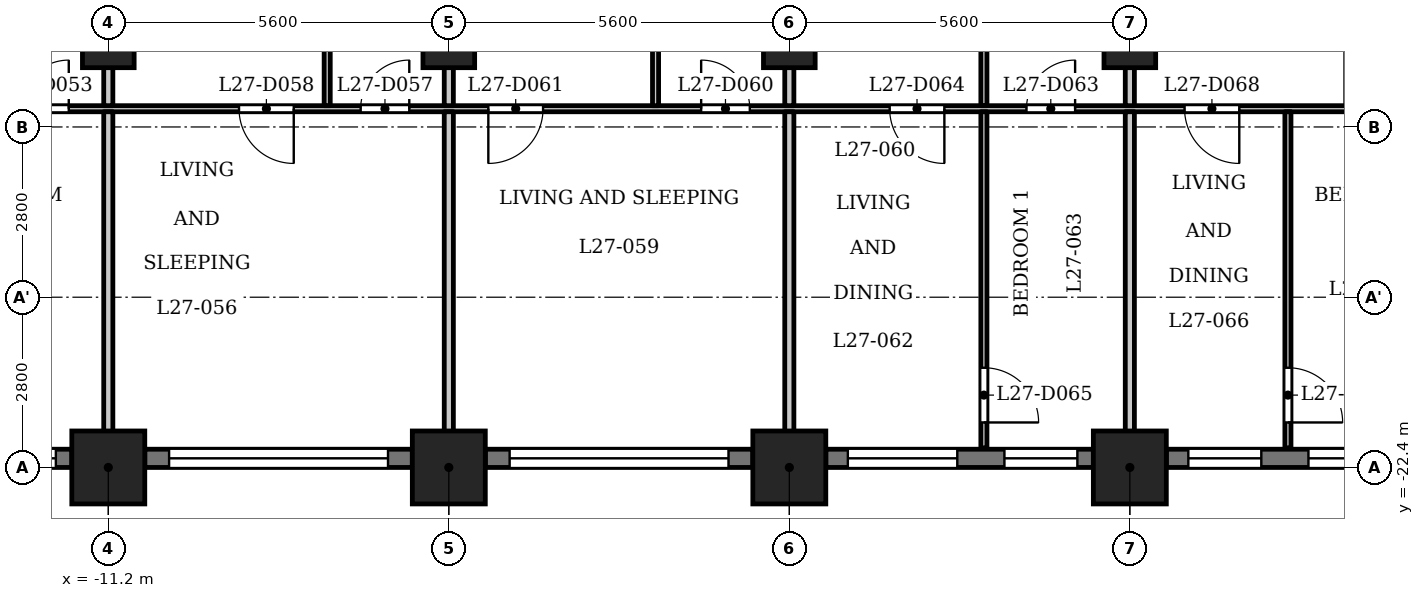
"""IFC4 building model, lengths in metres.
Left out: names, types, materials, properties, quantities, classifications, styles, units other than length and angle.
Written with IfcOpenShell. Run it as: python <this file> out.ifc"""

import sys

from ifc_helpers import new_model, si_unit, direction, frame, frame_2d, origin, origin_2d, place, context, subcontext, project, spatial, rectangle, extrude, element, fill, save


model = new_model("IFC4")
c1 = context("Model", 3, precision=1e-05, world=origin(), true_north=direction((0.0, 1.0)))
c2 = subcontext(c1, "Body", "Model", "MODEL_VIEW")
j1 = project(units=[si_unit("LENGTHUNIT", "METRE"), si_unit("PLANEANGLEUNIT", "RADIAN")], contexts=[c1])
p1 = place(None, origin())
s1 = spatial("IfcSite", under=j1, at=p1, CompositionType="ELEMENT")
p2 = place(p1, origin())
s2 = spatial("IfcBuilding", under=s1, at=p2, CompositionType="ELEMENT")
p3 = place(p2, frame((0.0, 0.0, 107.8)))
s3 = spatial("IfcBuildingStorey", under=s2, at=p3, CompositionType="ELEMENT", Elevation=107.8)
for number, where, z_axis, x_axis in (
    (1, (-11.2, -22.4, 0.0), (0.0, 0.0, 1.0), (1.0, 0.0, 0.0)),
    (2, (-5.6, -22.4, 0.0), (0.0, 0.0, 1.0), (1.0, 0.0, 0.0)),
    (3, (0.0, -22.4, 0.0), (0.0, 0.0, 1.0), (1.0, 0.0, 0.0)),
    (4, (5.6, -22.4, 0.0), (0.0, 0.0, 1.0), (1.0, 0.0, 0.0)),
):
    element("IfcColumn", number, at=place(p3, frame(where, z_axis=z_axis, x_axis=x_axis)), inside=s3, PredefinedType="COLUMN", context=c2, shape_type="SweptSolid", body=[
        extrude(rectangle(XDim=1.2, YDim=1.2, at=origin_2d()), origin(), (0.0, 0.0, 1.0), 3.5),
    ])
for number, where, z_axis, x_axis in (
    (5, (-11.2, -15.4, 0.0), (0.0, 0.0, 1.0), (1.0, 0.0, 0.0)),
    (6, (-5.6, -15.4, 0.0), (0.0, 0.0, 1.0), (1.0, 0.0, 0.0)),
    (7, (0.0, -15.4, 0.0), (0.0, 0.0, 1.0), (1.0, 0.0, 0.0)),
    (8, (5.6, -15.4, 0.0), (0.0, 0.0, 1.0), (1.0, 0.0, 0.0)),
):
    element("IfcColumn", number, at=place(p3, frame(where, z_axis=z_axis, x_axis=x_axis)), inside=s3, PredefinedType="COLUMN", context=c2, shape_type="SweptSolid", body=[
        extrude(rectangle(XDim=0.85, YDim=0.85, at=origin_2d()), origin(), (0.0, 0.0, 1.0), 3.5),
    ])
p4 = place(p3, frame((-16.2, -22.25, 0.0), z_axis=(0.0, 0.0, 1.0), x_axis=(1.0, 0.0, 0.0)))
e9 = element("IfcWall", 9, at=p4, inside=s3, PredefinedType="SOLIDWALL", context=c2, shape_type="SweptSolid", body=[
    extrude(rectangle(XDim=4.4, YDim=0.3, at=frame_2d((2.2, 0.0))), origin(), (0.0, 0.0, 1.0), 2.4),
])
p5 = place(p4, frame((0.363, 0.0, 0.6)))
e10 = element("IfcOpeningElement", 10, at=p5, cuts=e9, PredefinedType="OPENING", context=c2, shape_type="SweptSolid", body=[
    extrude(rectangle(XDim=1.2, YDim=1.55, at=frame_2d((0.6, 0.775))), frame((0.0, 0.16, 0.0), z_axis=(0.0, -1.0, 0.0), x_axis=(1.0, 0.0, 0.0)), (0.0, 0.0, 1.0), 0.32),
])
p6 = place(p4, frame((2.337, 0.0, 0.9)))
e11 = element("IfcOpeningElement", 11, at=p6, cuts=e9, PredefinedType="OPENING", context=c2, shape_type="SweptSolid", body=[
    extrude(rectangle(XDim=1.8, YDim=1.25, at=frame_2d((0.9, 0.625))), frame((0.0, 0.16, 0.0), z_axis=(0.0, -1.0, 0.0), x_axis=(1.0, 0.0, 0.0)), (0.0, 0.0, 1.0), 0.32),
])
p7 = place(p3, frame((-10.6, -22.25, 0.0), z_axis=(0.0, 0.0, 1.0), x_axis=(1.0, 0.0, 0.0)))
e12 = element("IfcWall", 12, at=p7, inside=s3, PredefinedType="SOLIDWALL", context=c2, shape_type="SweptSolid", body=[
    extrude(rectangle(XDim=4.4, YDim=0.3, at=frame_2d((2.2, 0.0))), origin(), (0.0, 0.0, 1.0), 2.4),
])
p8 = place(p7, frame((0.4, 0.0, 1.2)))
e13 = element("IfcOpeningElement", 13, at=p8, cuts=e12, PredefinedType="OPENING", context=c2, shape_type="SweptSolid", body=[
    extrude(rectangle(XDim=3.6, YDim=0.95, at=frame_2d((1.8, 0.475))), frame((0.0, 0.16, 0.0), z_axis=(0.0, -1.0, 0.0), x_axis=(1.0, 0.0, 0.0)), (0.0, 0.0, 1.0), 0.32),
])
p9 = place(p3, frame((-5.0, -22.25, 0.0), z_axis=(0.0, 0.0, 1.0), x_axis=(1.0, 0.0, 0.0)))
e14 = element("IfcWall", 14, at=p9, inside=s3, PredefinedType="SOLIDWALL", context=c2, shape_type="SweptSolid", body=[
    extrude(rectangle(XDim=4.4, YDim=0.3, at=frame_2d((2.2, 0.0))), origin(), (0.0, 0.0, 1.0), 2.4),
])
p10 = place(p9, frame((0.4, 0.0, 1.2)))
e15 = element("IfcOpeningElement", 15, at=p10, cuts=e14, PredefinedType="OPENING", context=c2, shape_type="SweptSolid", body=[
    extrude(rectangle(XDim=3.6, YDim=0.95, at=frame_2d((1.8, 0.475))), frame((0.0, 0.16, 0.0), z_axis=(0.0, -1.0, 0.0), x_axis=(1.0, 0.0, 0.0)), (0.0, 0.0, 1.0), 0.32),
])
p11 = place(p3, frame((0.6, -22.25, 0.0), z_axis=(0.0, 0.0, 1.0), x_axis=(1.0, 0.0, 0.0)))
e16 = element("IfcWall", 16, at=p11, inside=s3, PredefinedType="SOLIDWALL", context=c2, shape_type="SweptSolid", body=[
    extrude(rectangle(XDim=4.4, YDim=0.3, at=frame_2d((2.2, 0.0))), origin(), (0.0, 0.0, 1.0), 2.4),
])
p12 = place(p11, frame((0.363, 0.0, 0.9)))
e17 = element("IfcOpeningElement", 17, at=p12, cuts=e16, PredefinedType="OPENING", context=c2, shape_type="SweptSolid", body=[
    extrude(rectangle(XDim=1.8, YDim=1.25, at=frame_2d((0.9, 0.625))), frame((0.0, 0.16, 0.0), z_axis=(0.0, -1.0, 0.0), x_axis=(1.0, 0.0, 0.0)), (0.0, 0.0, 1.0), 0.32),
])
p13 = place(p11, frame((2.938, 0.0, 0.6)))
e18 = element("IfcOpeningElement", 18, at=p13, cuts=e16, PredefinedType="OPENING", context=c2, shape_type="SweptSolid", body=[
    extrude(rectangle(XDim=1.2, YDim=1.55, at=frame_2d((0.6, 0.775))), frame((0.0, 0.16, 0.0), z_axis=(0.0, -1.0, 0.0), x_axis=(1.0, 0.0, 0.0)), (0.0, 0.0, 1.0), 0.32),
])
p14 = place(p3, frame((6.2, -22.25, 0.0), z_axis=(0.0, 0.0, 1.0), x_axis=(1.0, 0.0, 0.0)))
e19 = element("IfcWall", 19, at=p14, inside=s3, PredefinedType="SOLIDWALL", context=c2, shape_type="SweptSolid", body=[
    extrude(rectangle(XDim=4.4, YDim=0.3, at=frame_2d((2.2, 0.0))), origin(), (0.0, 0.0, 1.0), 2.4),
])
p15 = place(p14, frame((0.363, 0.0, 0.6)))
e20 = element("IfcOpeningElement", 20, at=p15, cuts=e19, PredefinedType="OPENING", context=c2, shape_type="SweptSolid", body=[
    extrude(rectangle(XDim=1.2, YDim=1.55, at=frame_2d((0.6, 0.775))), frame((0.0, 0.16, 0.0), z_axis=(0.0, -1.0, 0.0), x_axis=(1.0, 0.0, 0.0)), (0.0, 0.0, 1.0), 0.32),
])
p16 = place(p14, frame((2.337, 0.0, 0.9)))
e21 = element("IfcOpeningElement", 21, at=p16, cuts=e19, PredefinedType="OPENING", context=c2, shape_type="SweptSolid", body=[
    extrude(rectangle(XDim=1.8, YDim=1.25, at=frame_2d((0.9, 0.625))), frame((0.0, 0.16, 0.0), z_axis=(0.0, -1.0, 0.0), x_axis=(1.0, 0.0, 0.0)), (0.0, 0.0, 1.0), 0.32),
])
p17 = place(p3, frame((-16.725, -16.5, 0.0), z_axis=(0.0, 0.0, 1.0), x_axis=(1.0, 0.0, 0.0)))
e22 = element("IfcWall", 22, at=p17, inside=s3, PredefinedType="PARTITIONING", context=c2, shape_type="SweptSolid", body=[
    extrude(rectangle(XDim=33.45, YDim=0.1, at=frame_2d((16.725, 0.0))), origin(), (0.0, 0.0, 1.0), 3.2),
])
p18 = place(p17, frame((4.075, 0.0, 0.0)))
e23 = element("IfcOpeningElement", 23, at=p18, cuts=e22, PredefinedType="OPENING", context=c2, shape_type="SweptSolid", body=[
    extrude(rectangle(XDim=0.8, YDim=2.1, at=frame_2d((0.4, 1.05))), frame((0.0, 0.06, 0.0), z_axis=(0.0, -1.0, 0.0), x_axis=(1.0, 0.0, 0.0)), (0.0, 0.0, 1.0), 0.12),
])
p19 = place(p17, frame((1.075, 0.0, 0.0)))
e24 = element("IfcOpeningElement", 24, at=p19, cuts=e22, PredefinedType="OPENING", context=c2, shape_type="SweptSolid", body=[
    extrude(rectangle(XDim=0.9, YDim=2.1, at=frame_2d((0.45, 1.05))), frame((0.0, 0.06, 0.0), z_axis=(0.0, -1.0, 0.0), x_axis=(1.0, 0.0, 0.0)), (0.0, 0.0, 1.0), 0.12),
])
p20 = place(p17, frame((9.675, 0.0, 0.0)))
e25 = element("IfcOpeningElement", 25, at=p20, cuts=e22, PredefinedType="OPENING", context=c2, shape_type="SweptSolid", body=[
    extrude(rectangle(XDim=0.8, YDim=2.1, at=frame_2d((0.4, 1.05))), frame((0.0, 0.06, 0.0), z_axis=(0.0, -1.0, 0.0), x_axis=(1.0, 0.0, 0.0)), (0.0, 0.0, 1.0), 0.12),
])
p21 = place(p17, frame((7.675, 0.0, 0.0)))
e26 = element("IfcOpeningElement", 26, at=p21, cuts=e22, PredefinedType="OPENING", context=c2, shape_type="SweptSolid", body=[
    extrude(rectangle(XDim=0.9, YDim=2.1, at=frame_2d((0.45, 1.05))), frame((0.0, 0.06, 0.0), z_axis=(0.0, -1.0, 0.0), x_axis=(1.0, 0.0, 0.0)), (0.0, 0.0, 1.0), 0.12),
])
p22 = place(p17, frame((15.275, 0.0, 0.0)))
e27 = element("IfcOpeningElement", 27, at=p22, cuts=e22, PredefinedType="OPENING", context=c2, shape_type="SweptSolid", body=[
    extrude(rectangle(XDim=0.8, YDim=2.1, at=frame_2d((0.4, 1.05))), frame((0.0, 0.06, 0.0), z_axis=(0.0, -1.0, 0.0), x_axis=(1.0, 0.0, 0.0)), (0.0, 0.0, 1.0), 0.12),
])
p23 = place(p17, frame((11.775, 0.0, 0.0)))
e28 = element("IfcOpeningElement", 28, at=p23, cuts=e22, PredefinedType="OPENING", context=c2, shape_type="SweptSolid", body=[
    extrude(rectangle(XDim=0.9, YDim=2.1, at=frame_2d((0.45, 1.05))), frame((0.0, 0.06, 0.0), z_axis=(0.0, -1.0, 0.0), x_axis=(1.0, 0.0, 0.0)), (0.0, 0.0, 1.0), 0.12),
])
p24 = place(p17, frame((20.625, 0.0, 0.0)))
e29 = element("IfcOpeningElement", 29, at=p24, cuts=e22, PredefinedType="OPENING", context=c2, shape_type="SweptSolid", body=[
    extrude(rectangle(XDim=0.8, YDim=2.1, at=frame_2d((0.4, 1.05))), frame((0.0, 0.06, 0.0), z_axis=(0.0, -1.0, 0.0), x_axis=(1.0, 0.0, 0.0)), (0.0, 0.0, 1.0), 0.12),
])
p25 = place(p17, frame((18.375, 0.0, 0.0)))
e30 = element("IfcOpeningElement", 30, at=p25, cuts=e22, PredefinedType="OPENING", context=c2, shape_type="SweptSolid", body=[
    extrude(rectangle(XDim=0.9, YDim=2.1, at=frame_2d((0.45, 1.05))), frame((0.0, 0.06, 0.0), z_axis=(0.0, -1.0, 0.0), x_axis=(1.0, 0.0, 0.0)), (0.0, 0.0, 1.0), 0.12),
])
p26 = place(p17, frame((26.475, 0.0, 0.0)))
e31 = element("IfcOpeningElement", 31, at=p26, cuts=e22, PredefinedType="OPENING", context=c2, shape_type="SweptSolid", body=[
    extrude(rectangle(XDim=0.8, YDim=2.1, at=frame_2d((0.4, 1.05))), frame((0.0, 0.06, 0.0), z_axis=(0.0, -1.0, 0.0), x_axis=(1.0, 0.0, 0.0)), (0.0, 0.0, 1.0), 0.12),
])
p27 = place(p17, frame((23.225, 0.0, 0.0)))
e32 = element("IfcOpeningElement", 32, at=p27, cuts=e22, PredefinedType="OPENING", context=c2, shape_type="SweptSolid", body=[
    extrude(rectangle(XDim=0.9, YDim=2.1, at=frame_2d((0.45, 1.05))), frame((0.0, 0.06, 0.0), z_axis=(0.0, -1.0, 0.0), x_axis=(1.0, 0.0, 0.0)), (0.0, 0.0, 1.0), 0.12),
])
p28 = place(p17, frame((29.475, 0.0, 0.0)))
e33 = element("IfcOpeningElement", 33, at=p28, cuts=e22, PredefinedType="OPENING", context=c2, shape_type="SweptSolid", body=[
    extrude(rectangle(XDim=0.8, YDim=2.1, at=frame_2d((0.4, 1.05))), frame((0.0, 0.06, 0.0), z_axis=(0.0, -1.0, 0.0), x_axis=(1.0, 0.0, 0.0)), (0.0, 0.0, 1.0), 0.12),
])
p29 = place(p17, frame((31.825, 0.0, 0.0)))
e34 = element("IfcOpeningElement", 34, at=p29, cuts=e22, PredefinedType="OPENING", context=c2, shape_type="SweptSolid", body=[
    extrude(rectangle(XDim=0.9, YDim=2.1, at=frame_2d((0.45, 1.05))), frame((0.0, 0.06, 0.0), z_axis=(0.0, -1.0, 0.0), x_axis=(1.0, 0.0, 0.0)), (0.0, 0.0, 1.0), 0.12),
])
p30 = place(p3, frame((-11.2, -22.98, 0.0), z_axis=(0.0, 0.0, 1.0), x_axis=(0.0, 1.0, 0.0)))
e35 = element("IfcWall", 35, at=p30, inside=s3, PredefinedType="PARTITIONING", context=c2, shape_type="SweptSolid", body=[
    extrude(rectangle(XDim=6.43, YDim=0.15, at=frame_2d((3.215, 0.0))), origin(), (0.0, 0.0, 1.0), 3.2),
])
p31 = place(p3, frame((-11.2, -16.45, 0.0), z_axis=(0.0, 0.0, 1.0), x_axis=(0.0, 1.0, 0.0)))
e36 = element("IfcWall", 36, at=p31, inside=s3, PredefinedType="PARTITIONING", context=c2, shape_type="SweptSolid", body=[
    extrude(rectangle(XDim=3.175, YDim=0.15, at=frame_2d((1.587, 0.0))), origin(), (0.0, 0.0, 1.0), 3.2),
])
p32 = place(p3, frame((-7.6, -16.45, 0.0), z_axis=(0.0, 0.0, 1.0), x_axis=(0.0, 1.0, 0.0)))
e37 = element("IfcWall", 37, at=p32, inside=s3, PredefinedType="PARTITIONING", context=c2, shape_type="SweptSolid", body=[
    extrude(rectangle(XDim=3.175, YDim=0.1, at=frame_2d((1.587, 0.0))), origin(), (0.0, 0.0, 1.0), 3.2),
])
p33 = place(p3, frame((-5.6, -22.98, 0.0), z_axis=(0.0, 0.0, 1.0), x_axis=(0.0, 1.0, 0.0)))
e38 = element("IfcWall", 38, at=p33, inside=s3, PredefinedType="PARTITIONING", context=c2, shape_type="SweptSolid", body=[
    extrude(rectangle(XDim=6.43, YDim=0.15, at=frame_2d((3.215, 0.0))), origin(), (0.0, 0.0, 1.0), 3.2),
])
p34 = place(p3, frame((-5.6, -16.45, 0.0), z_axis=(0.0, 0.0, 1.0), x_axis=(0.0, 1.0, 0.0)))
e39 = element("IfcWall", 39, at=p34, inside=s3, PredefinedType="PARTITIONING", context=c2, shape_type="SweptSolid", body=[
    extrude(rectangle(XDim=3.175, YDim=0.15, at=frame_2d((1.587, 0.0))), origin(), (0.0, 0.0, 1.0), 3.2),
])
p35 = place(p3, frame((-2.2, -16.45, 0.0), z_axis=(0.0, 0.0, 1.0), x_axis=(0.0, 1.0, 0.0)))
e40 = element("IfcWall", 40, at=p35, inside=s3, PredefinedType="PARTITIONING", context=c2, shape_type="SweptSolid", body=[
    extrude(rectangle(XDim=3.175, YDim=0.1, at=frame_2d((1.587, 0.0))), origin(), (0.0, 0.0, 1.0), 3.2),
])
p36 = place(p3, frame((0.0, -22.98, 0.0), z_axis=(0.0, 0.0, 1.0), x_axis=(0.0, 1.0, 0.0)))
e41 = element("IfcWall", 41, at=p36, inside=s3, PredefinedType="PARTITIONING", context=c2, shape_type="SweptSolid", body=[
    extrude(rectangle(XDim=6.43, YDim=0.15, at=frame_2d((3.215, 0.0))), origin(), (0.0, 0.0, 1.0), 3.2),
])
p37 = place(p3, frame((0.0, -16.45, 0.0), z_axis=(0.0, 0.0, 1.0), x_axis=(0.0, 1.0, 0.0)))
e42 = element("IfcWall", 42, at=p37, inside=s3, PredefinedType="PARTITIONING", context=c2, shape_type="SweptSolid", body=[
    extrude(rectangle(XDim=3.175, YDim=0.15, at=frame_2d((1.587, 0.0))), origin(), (0.0, 0.0, 1.0), 3.2),
])
p38 = place(p3, frame((3.2, -22.08, 0.0), z_axis=(0.0, 0.0, 1.0), x_axis=(0.0, 1.0, 0.0)))
e43 = element("IfcWall", 43, at=p38, inside=s3, PredefinedType="PARTITIONING", context=c2, shape_type="SweptSolid", body=[
    extrude(rectangle(XDim=5.53, YDim=0.1, at=frame_2d((2.765, 0.0))), origin(), (0.0, 0.0, 1.0), 3.2),
])
p39 = place(p38, frame((0.42, 0.0, 0.0)))
e44 = element("IfcOpeningElement", 44, at=p39, cuts=e43, PredefinedType="OPENING", context=c2, shape_type="SweptSolid", body=[
    extrude(rectangle(XDim=0.9, YDim=2.1, at=frame_2d((0.45, 1.05))), frame((0.0, 0.06, 0.0), z_axis=(0.0, -1.0, 0.0), x_axis=(1.0, 0.0, 0.0)), (0.0, 0.0, 1.0), 0.12),
])
p40 = place(p3, frame((3.2, -16.45, 0.0), z_axis=(0.0, 0.0, 1.0), x_axis=(0.0, 1.0, 0.0)))
e45 = element("IfcWall", 45, at=p40, inside=s3, PredefinedType="PARTITIONING", context=c2, shape_type="SweptSolid", body=[
    extrude(rectangle(XDim=3.175, YDim=0.1, at=frame_2d((1.587, 0.0))), origin(), (0.0, 0.0, 1.0), 3.2),
])
p41 = place(p3, frame((5.6, -22.98, 0.0), z_axis=(0.0, 0.0, 1.0), x_axis=(0.0, 1.0, 0.0)))
e46 = element("IfcWall", 46, at=p41, inside=s3, PredefinedType="PARTITIONING", context=c2, shape_type="SweptSolid", body=[
    extrude(rectangle(XDim=6.43, YDim=0.15, at=frame_2d((3.215, 0.0))), origin(), (0.0, 0.0, 1.0), 3.2),
])
p42 = place(p3, frame((5.6, -16.45, 0.0), z_axis=(0.0, 0.0, 1.0), x_axis=(0.0, 1.0, 0.0)))
e47 = element("IfcWall", 47, at=p42, inside=s3, PredefinedType="PARTITIONING", context=c2, shape_type="SweptSolid", body=[
    extrude(rectangle(XDim=3.175, YDim=0.15, at=frame_2d((1.587, 0.0))), origin(), (0.0, 0.0, 1.0), 3.2),
])
p43 = place(p3, frame((8.2, -22.08, 0.0), z_axis=(0.0, 0.0, 1.0), x_axis=(0.0, 1.0, 0.0)))
e48 = element("IfcWall", 48, at=p43, inside=s3, PredefinedType="PARTITIONING", context=c2, shape_type="SweptSolid", body=[
    extrude(rectangle(XDim=5.53, YDim=0.1, at=frame_2d((2.765, 0.0))), origin(), (0.0, 0.0, 1.0), 3.2),
])
p44 = place(p43, frame((0.42, 0.0, 0.0)))
e49 = element("IfcOpeningElement", 49, at=p44, cuts=e48, PredefinedType="OPENING", context=c2, shape_type="SweptSolid", body=[
    extrude(rectangle(XDim=0.9, YDim=2.1, at=frame_2d((0.45, 1.05))), frame((0.0, 0.06, 0.0), z_axis=(0.0, -1.0, 0.0), x_axis=(1.0, 0.0, 0.0)), (0.0, 0.0, 1.0), 0.12),
])
p45 = place(p18, origin())
e50 = element("IfcDoor", 50, at=p45, inside=s3, OperationType="SINGLE_SWING_LEFT", PredefinedType="DOOR", context=c2, shape_type="SweptSolid", body=[
    extrude(rectangle(XDim=0.8, YDim=2.1, at=frame_2d((0.4, 1.05))), frame((0.0, 0.025, 0.0), z_axis=(0.0, -1.0, 0.0), x_axis=(1.0, 0.0, 0.0)), (0.0, 0.0, 1.0), 0.05),
])
fill(e23, e50)
p46 = place(p20, origin())
e51 = element("IfcDoor", 51, at=p46, inside=s3, OperationType="SINGLE_SWING_LEFT", PredefinedType="DOOR", context=c2, shape_type="SweptSolid", body=[
    extrude(rectangle(XDim=0.8, YDim=2.1, at=frame_2d((0.4, 1.05))), frame((0.0, 0.025, 0.0), z_axis=(0.0, -1.0, 0.0), x_axis=(1.0, 0.0, 0.0)), (0.0, 0.0, 1.0), 0.05),
])
fill(e25, e51)
p47 = place(p21, origin())
e52 = element("IfcDoor", 52, at=p47, inside=s3, OperationType="SINGLE_SWING_RIGHT", PredefinedType="DOOR", context=c2, shape_type="SweptSolid", body=[
    extrude(rectangle(XDim=0.9, YDim=2.1, at=frame_2d((0.45, 1.05))), frame((0.0, 0.025, 0.0), z_axis=(0.0, -1.0, 0.0), x_axis=(1.0, 0.0, 0.0)), (0.0, 0.0, 1.0), 0.05),
])
fill(e26, e52)
p48 = place(p22, origin())
e53 = element("IfcDoor", 53, at=p48, inside=s3, OperationType="SINGLE_SWING_RIGHT", PredefinedType="DOOR", context=c2, shape_type="SweptSolid", body=[
    extrude(rectangle(XDim=0.8, YDim=2.1, at=frame_2d((0.4, 1.05))), frame((0.0, 0.025, 0.0), z_axis=(0.0, -1.0, 0.0), x_axis=(1.0, 0.0, 0.0)), (0.0, 0.0, 1.0), 0.05),
])
fill(e27, e53)
p49 = place(p23, origin())
e54 = element("IfcDoor", 54, at=p49, inside=s3, OperationType="SINGLE_SWING_LEFT", PredefinedType="DOOR", context=c2, shape_type="SweptSolid", body=[
    extrude(rectangle(XDim=0.9, YDim=2.1, at=frame_2d((0.45, 1.05))), frame((0.0, 0.025, 0.0), z_axis=(0.0, -1.0, 0.0), x_axis=(1.0, 0.0, 0.0)), (0.0, 0.0, 1.0), 0.05),
])
fill(e28, e54)
p50 = place(p24, origin())
e55 = element("IfcDoor", 55, at=p50, inside=s3, OperationType="SINGLE_SWING_LEFT", PredefinedType="DOOR", context=c2, shape_type="SweptSolid", body=[
    extrude(rectangle(XDim=0.8, YDim=2.1, at=frame_2d((0.4, 1.05))), frame((0.0, 0.025, 0.0), z_axis=(0.0, -1.0, 0.0), x_axis=(1.0, 0.0, 0.0)), (0.0, 0.0, 1.0), 0.05),
])
fill(e29, e55)
p51 = place(p25, origin())
e56 = element("IfcDoor", 56, at=p51, inside=s3, OperationType="SINGLE_SWING_RIGHT", PredefinedType="DOOR", context=c2, shape_type="SweptSolid", body=[
    extrude(rectangle(XDim=0.9, YDim=2.1, at=frame_2d((0.45, 1.05))), frame((0.0, 0.025, 0.0), z_axis=(0.0, -1.0, 0.0), x_axis=(1.0, 0.0, 0.0)), (0.0, 0.0, 1.0), 0.05),
])
fill(e30, e56)
p52 = place(p39, origin())
e57 = element("IfcDoor", 57, at=p52, inside=s3, OperationType="SINGLE_SWING_LEFT", PredefinedType="DOOR", context=c2, shape_type="SweptSolid", body=[
    extrude(rectangle(XDim=0.9, YDim=2.1, at=frame_2d((0.45, 1.05))), frame((0.0, 0.025, 0.0), z_axis=(0.0, -1.0, 0.0), x_axis=(1.0, 0.0, 0.0)), (0.0, 0.0, 1.0), 0.05),
])
fill(e44, e57)
p53 = place(p27, origin())
e58 = element("IfcDoor", 58, at=p53, inside=s3, OperationType="SINGLE_SWING_RIGHT", PredefinedType="DOOR", context=c2, shape_type="SweptSolid", body=[
    extrude(rectangle(XDim=0.9, YDim=2.1, at=frame_2d((0.45, 1.05))), frame((0.0, 0.025, 0.0), z_axis=(0.0, -1.0, 0.0), x_axis=(1.0, 0.0, 0.0)), (0.0, 0.0, 1.0), 0.05),
])
fill(e32, e58)
p54 = place(p44, origin())
e59 = element("IfcDoor", 59, at=p54, inside=s3, OperationType="SINGLE_SWING_LEFT", PredefinedType="DOOR", context=c2, shape_type="SweptSolid", body=[
    extrude(rectangle(XDim=0.9, YDim=2.1, at=frame_2d((0.45, 1.05))), frame((0.0, 0.025, 0.0), z_axis=(0.0, -1.0, 0.0), x_axis=(1.0, 0.0, 0.0)), (0.0, 0.0, 1.0), 0.05),
])
fill(e49, e59)
p55 = place(p6, origin())
e60 = element("IfcWindow", 60, at=p55, inside=s3, PartitioningType="SINGLE_PANEL", PredefinedType="WINDOW", context=c2, shape_type="SweptSolid", body=[
    extrude(rectangle(XDim=1.8, YDim=1.25, at=frame_2d((0.9, 0.625))), frame((0.0, 0.03, 0.0), z_axis=(0.0, -1.0, 0.0), x_axis=(1.0, 0.0, 0.0)), (0.0, 0.0, 1.0), 0.06),
])
fill(e11, e60)
p56 = place(p8, origin())
e61 = element("IfcWindow", 61, at=p56, inside=s3, PartitioningType="SINGLE_PANEL", PredefinedType="WINDOW", context=c2, shape_type="SweptSolid", body=[
    extrude(rectangle(XDim=3.6, YDim=0.95, at=frame_2d((1.8, 0.475))), frame((0.0, 0.03, 0.0), z_axis=(0.0, -1.0, 0.0), x_axis=(1.0, 0.0, 0.0)), (0.0, 0.0, 1.0), 0.06),
])
fill(e13, e61)
p57 = place(p10, origin())
e62 = element("IfcWindow", 62, at=p57, inside=s3, PartitioningType="SINGLE_PANEL", PredefinedType="WINDOW", context=c2, shape_type="SweptSolid", body=[
    extrude(rectangle(XDim=3.6, YDim=0.95, at=frame_2d((1.8, 0.475))), frame((0.0, 0.03, 0.0), z_axis=(0.0, -1.0, 0.0), x_axis=(1.0, 0.0, 0.0)), (0.0, 0.0, 1.0), 0.06),
])
fill(e15, e62)
p58 = place(p12, origin())
e63 = element("IfcWindow", 63, at=p58, inside=s3, PartitioningType="SINGLE_PANEL", PredefinedType="WINDOW", context=c2, shape_type="SweptSolid", body=[
    extrude(rectangle(XDim=1.8, YDim=1.25, at=frame_2d((0.9, 0.625))), frame((0.0, 0.03, 0.0), z_axis=(0.0, -1.0, 0.0), x_axis=(1.0, 0.0, 0.0)), (0.0, 0.0, 1.0), 0.06),
])
fill(e17, e63)
p59 = place(p13, origin())
e64 = element("IfcWindow", 64, at=p59, inside=s3, PartitioningType="SINGLE_PANEL", PredefinedType="WINDOW", context=c2, shape_type="SweptSolid", body=[
    extrude(rectangle(XDim=1.2, YDim=1.55, at=frame_2d((0.6, 0.775))), frame((0.0, 0.03, 0.0), z_axis=(0.0, -1.0, 0.0), x_axis=(1.0, 0.0, 0.0)), (0.0, 0.0, 1.0), 0.06),
])
fill(e18, e64)
p60 = place(p15, origin())
e65 = element("IfcWindow", 65, at=p60, inside=s3, PartitioningType="SINGLE_PANEL", PredefinedType="WINDOW", context=c2, shape_type="SweptSolid", body=[
    extrude(rectangle(XDim=1.2, YDim=1.55, at=frame_2d((0.6, 0.775))), frame((0.0, 0.03, 0.0), z_axis=(0.0, -1.0, 0.0), x_axis=(1.0, 0.0, 0.0)), (0.0, 0.0, 1.0), 0.06),
])
fill(e20, e65)
p61 = place(p16, origin())
e66 = element("IfcWindow", 66, at=p61, inside=s3, PartitioningType="SINGLE_PANEL", PredefinedType="WINDOW", context=c2, shape_type="SweptSolid", body=[
    extrude(rectangle(XDim=1.8, YDim=1.25, at=frame_2d((0.9, 0.625))), frame((0.0, 0.03, 0.0), z_axis=(0.0, -1.0, 0.0), x_axis=(1.0, 0.0, 0.0)), (0.0, 0.0, 1.0), 0.06),
])
fill(e21, e66)
save(model, sys.argv[1])
